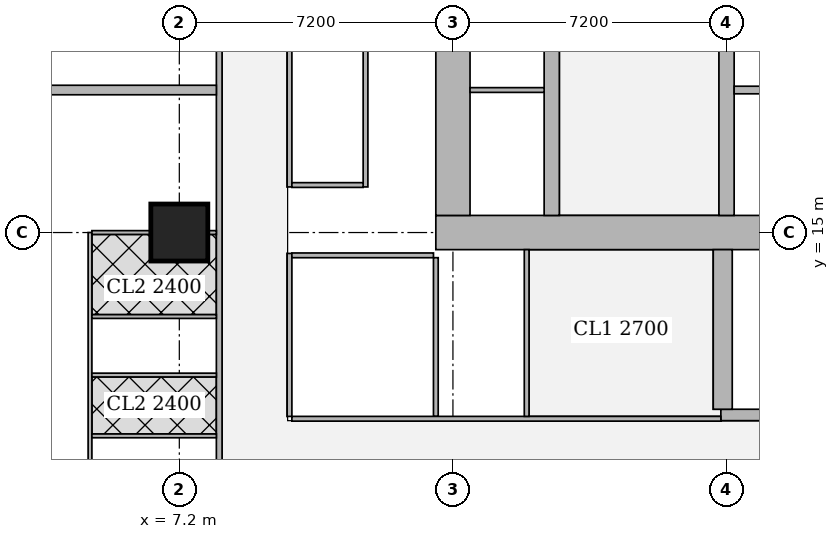
"""IFC4 building model, lengths in metres.
Left out: names, types, materials, properties, quantities, classifications, styles, units other than length and angle.
Written with IfcOpenShell. Run it as: python <this file> out.ifc"""

import sys

from ifc_helpers import new_model, si_unit, direction, frame, frame_2d, origin, origin_2d, place, context, subcontext, project, spatial, rectangle, extrude, element, fill, save


model = new_model("IFC4")
c1 = context("Model", 3, precision=1e-05, world=origin(), true_north=direction((0.0, 1.0)))
c2 = subcontext(c1, "Body", "Model", "MODEL_VIEW")
j1 = project(units=[si_unit("LENGTHUNIT", "METRE"), si_unit("PLANEANGLEUNIT", "RADIAN")], contexts=[c1])
p1 = place(None, origin())
s1 = spatial("IfcSite", under=j1, at=p1, CompositionType="ELEMENT")
p2 = place(p1, origin())
s2 = spatial("IfcBuilding", under=s1, at=p2, CompositionType="ELEMENT")
p3 = place(p2, frame((0.0, 0.0, 147.05)))
s3 = spatial("IfcBuildingStorey", under=s2, at=p3, CompositionType="ELEMENT", Elevation=147.05)
p4 = place(p3, frame((7.2, 15.0, 0.0), z_axis=(0.0, 0.0, 1.0), x_axis=(1.0, 0.0, 0.0)))
e1 = element("IfcColumn", 1, at=p4, inside=s3, PredefinedType="COLUMN", context=c2, shape_type="SweptSolid", body=[
    extrude(rectangle(XDim=1.5, YDim=1.5, at=origin_2d()), origin(), (0.0, 0.0, 1.0), 3.75),
])
p5 = place(p3, frame((13.95, 15.0, 0.0), z_axis=(0.0, 0.0, 1.0), x_axis=(1.0, 0.0, 0.0)))
e2 = element("IfcWall", 2, at=p5, inside=s3, PredefinedType="SHEAR", context=c2, shape_type="SweptSolid", body=[
    extrude(rectangle(XDim=15.3, YDim=0.9, at=frame_2d((7.65, 0.0))), origin(), (0.0, 0.0, 1.0), 3.75),
])
p6 = place(p5, frame((4.45, 0.0, 0.0)))
e3 = element("IfcOpeningElement", 3, at=p6, cuts=e2, PredefinedType="OPENING", context=c2, shape_type="SweptSolid", body=[
    extrude(rectangle(XDim=1.8, YDim=2.1, at=frame_2d((0.9, 1.05))), frame((0.0, 0.46, 0.0), z_axis=(0.0, -1.0, 0.0), x_axis=(1.0, 0.0, 0.0)), (0.0, 0.0, 1.0), 0.92),
])
p7 = place(p5, frame((10.7, 0.0, 0.0)))
e4 = element("IfcOpeningElement", 4, at=p7, cuts=e2, PredefinedType="OPENING", context=c2, shape_type="SweptSolid", body=[
    extrude(rectangle(XDim=1.1, YDim=2.1, at=frame_2d((0.55, 1.05))), frame((0.0, 0.46, 0.0), z_axis=(0.0, -1.0, 0.0), x_axis=(1.0, 0.0, 0.0)), (0.0, 0.0, 1.0), 0.92),
])
p8 = place(p3, frame((14.4, 15.45, 0.0), z_axis=(0.0, 0.0, 1.0), x_axis=(0.0, 1.0, 0.0)))
e5 = element("IfcWall", 5, at=p8, inside=s3, PredefinedType="SHEAR", context=c2, shape_type="SweptSolid", body=[
    extrude(rectangle(XDim=14.1, YDim=0.9, at=frame_2d((7.05, 0.0))), origin(), (0.0, 0.0, 1.0), 3.75),
])
p9 = place(p3, frame((17.0, 15.45, 0.0), z_axis=(0.0, 0.0, 1.0), x_axis=(0.0, 1.0, 0.0)))
e6 = element("IfcWall", 6, at=p9, inside=s3, PredefinedType="SHEAR", context=c2, shape_type="SweptSolid", body=[
    extrude(rectangle(XDim=14.1, YDim=0.4, at=frame_2d((7.05, 0.0))), origin(), (0.0, 0.0, 1.0), 3.75),
])
p10 = place(p9, frame((0.925, 0.0, 0.0)))
e7 = element("IfcOpeningElement", 7, at=p10, cuts=e6, PredefinedType="OPENING", context=c2, shape_type="SweptSolid", body=[
    extrude(rectangle(XDim=1.0, YDim=2.1, at=frame_2d((0.5, 1.05))), frame((0.0, 0.21, 0.0), z_axis=(0.0, -1.0, 0.0), x_axis=(1.0, 0.0, 0.0)), (0.0, 0.0, 1.0), 0.42),
])
p11 = place(p9, frame((4.675, 0.0, 0.0)))
e8 = element("IfcOpeningElement", 8, at=p11, cuts=e6, PredefinedType="OPENING", context=c2, shape_type="SweptSolid", body=[
    extrude(rectangle(XDim=1.0, YDim=2.1, at=frame_2d((0.5, 1.05))), frame((0.0, 0.21, 0.0), z_axis=(0.0, -1.0, 0.0), x_axis=(1.0, 0.0, 0.0)), (0.0, 0.0, 1.0), 0.42),
])
p12 = place(p9, frame((8.425, 0.0, 0.0)))
e9 = element("IfcOpeningElement", 9, at=p12, cuts=e6, PredefinedType="OPENING", context=c2, shape_type="SweptSolid", body=[
    extrude(rectangle(XDim=1.0, YDim=2.1, at=frame_2d((0.5, 1.05))), frame((0.0, 0.21, 0.0), z_axis=(0.0, -1.0, 0.0), x_axis=(1.0, 0.0, 0.0)), (0.0, 0.0, 1.0), 0.42),
])
p13 = place(p9, frame((12.175, 0.0, 0.0)))
e10 = element("IfcOpeningElement", 10, at=p13, cuts=e6, PredefinedType="OPENING", context=c2, shape_type="SweptSolid", body=[
    extrude(rectangle(XDim=1.0, YDim=2.1, at=frame_2d((0.5, 1.05))), frame((0.0, 0.21, 0.0), z_axis=(0.0, -1.0, 0.0), x_axis=(1.0, 0.0, 0.0)), (0.0, 0.0, 1.0), 0.42),
])
p14 = place(p3, frame((21.6, 15.45, 0.0), z_axis=(0.0, 0.0, 1.0), x_axis=(0.0, 1.0, 0.0)))
e11 = element("IfcWall", 11, at=p14, inside=s3, PredefinedType="SHEAR", context=c2, shape_type="SweptSolid", body=[
    extrude(rectangle(XDim=14.1, YDim=0.4, at=frame_2d((7.05, 0.0))), origin(), (0.0, 0.0, 1.0), 3.75),
])
p15 = place(p14, frame((0.875, 0.0, 0.0)))
e12 = element("IfcOpeningElement", 12, at=p15, cuts=e11, PredefinedType="OPENING", context=c2, shape_type="SweptSolid", body=[
    extrude(rectangle(XDim=1.1, YDim=2.1, at=frame_2d((0.55, 1.05))), frame((0.0, 0.21, 0.0), z_axis=(0.0, -1.0, 0.0), x_axis=(1.0, 0.0, 0.0)), (0.0, 0.0, 1.0), 0.42),
])
p16 = place(p14, frame((4.625, 0.0, 0.0)))
e13 = element("IfcOpeningElement", 13, at=p16, cuts=e11, PredefinedType="OPENING", context=c2, shape_type="SweptSolid", body=[
    extrude(rectangle(XDim=1.1, YDim=2.1, at=frame_2d((0.55, 1.05))), frame((0.0, 0.21, 0.0), z_axis=(0.0, -1.0, 0.0), x_axis=(1.0, 0.0, 0.0)), (0.0, 0.0, 1.0), 0.42),
])
p17 = place(p14, frame((8.375, 0.0, 0.0)))
e14 = element("IfcOpeningElement", 14, at=p17, cuts=e11, PredefinedType="OPENING", context=c2, shape_type="SweptSolid", body=[
    extrude(rectangle(XDim=1.1, YDim=2.1, at=frame_2d((0.55, 1.05))), frame((0.0, 0.21, 0.0), z_axis=(0.0, -1.0, 0.0), x_axis=(1.0, 0.0, 0.0)), (0.0, 0.0, 1.0), 0.42),
])
p18 = place(p14, frame((12.125, 0.0, 0.0)))
e15 = element("IfcOpeningElement", 15, at=p18, cuts=e11, PredefinedType="OPENING", context=c2, shape_type="SweptSolid", body=[
    extrude(rectangle(XDim=1.1, YDim=2.1, at=frame_2d((0.55, 1.05))), frame((0.0, 0.21, 0.0), z_axis=(0.0, -1.0, 0.0), x_axis=(1.0, 0.0, 0.0)), (0.0, 0.0, 1.0), 0.42),
])
p19 = place(p3, frame((21.45, 10.2, 0.0), z_axis=(0.0, 0.0, 1.0), x_axis=(1.0, 0.0, 0.0)))
e16 = element("IfcWall", 16, at=p19, inside=s3, PredefinedType="SHEAR", context=c2, shape_type="SweptSolid", body=[
    extrude(rectangle(XDim=7.5, YDim=0.3, at=frame_2d((3.75, 0.0))), origin(), (0.0, 0.0, 1.0), 3.75),
])
p20 = place(p19, frame((0.5, 0.0, 0.0)))
e17 = element("IfcOpeningElement", 17, at=p20, cuts=e16, PredefinedType="OPENING", context=c2, shape_type="SweptSolid", body=[
    extrude(rectangle(XDim=1.1, YDim=2.1, at=frame_2d((0.55, 1.05))), frame((0.0, 0.16, 0.0), z_axis=(0.0, -1.0, 0.0), x_axis=(1.0, 0.0, 0.0)), (0.0, 0.0, 1.0), 0.32),
])
p21 = place(p3, frame((21.5, 10.35, 0.0), z_axis=(0.0, 0.0, 1.0), x_axis=(0.0, 1.0, 0.0)))
e18 = element("IfcWall", 18, at=p21, inside=s3, PredefinedType="SHEAR", context=c2, shape_type="SweptSolid", body=[
    extrude(rectangle(XDim=4.2, YDim=0.5, at=frame_2d((2.1, 0.0))), origin(), (0.0, 0.0, 1.0), 3.75),
])
p22 = place(p3, frame((8.25, 1.957, 0.0), z_axis=(0.0, 0.0, 1.0), x_axis=(0.0, 1.0, 0.0)))
e19 = element("IfcWall", 19, at=p22, inside=s3, PredefinedType="SOLIDWALL", context=c2, shape_type="SweptSolid", body=[
    extrude(rectangle(XDim=41.111, YDim=0.15, at=frame_2d((20.556, 0.0))), origin(), (0.0, 0.0, 1.0), 3.5),
])
p23 = place(p22, frame((14.418, 0.0, 0.0)))
e20 = element("IfcOpeningElement", 20, at=p23, cuts=e19, PredefinedType="OPENING", context=c2, shape_type="SweptSolid", body=[
    extrude(rectangle(XDim=1.0, YDim=2.1, at=frame_2d((0.5, 1.05))), frame((0.0, 0.085, 0.0), z_axis=(0.0, -1.0, 0.0), x_axis=(1.0, 0.0, 0.0)), (0.0, 0.0, 1.0), 0.17),
])
p24 = place(p22, frame((18.168, 0.0, 0.0)))
e21 = element("IfcOpeningElement", 21, at=p24, cuts=e19, PredefinedType="OPENING", context=c2, shape_type="SweptSolid", body=[
    extrude(rectangle(XDim=1.0, YDim=2.1, at=frame_2d((0.5, 1.05))), frame((0.0, 0.085, 0.0), z_axis=(0.0, -1.0, 0.0), x_axis=(1.0, 0.0, 0.0)), (0.0, 0.0, 1.0), 0.17),
])
p25 = place(p22, frame((33.168, 0.0, 0.0)))
e22 = element("IfcOpeningElement", 22, at=p25, cuts=e19, PredefinedType="OPENING", context=c2, shape_type="SweptSolid", body=[
    extrude(rectangle(XDim=1.0, YDim=2.1, at=frame_2d((0.5, 1.05))), frame((0.0, 0.085, 0.0), z_axis=(0.0, -1.0, 0.0), x_axis=(1.0, 0.0, 0.0)), (0.0, 0.0, 1.0), 0.17),
])
p26 = place(p3, frame((4.85, 2.505, 0.0), z_axis=(0.0, 0.0, 1.0), x_axis=(0.0, 1.0, 0.0)))
e23 = element("IfcWall", 23, at=p26, inside=s3, PredefinedType="PARTITIONING", context=c2, shape_type="SweptSolid", body=[
    extrude(rectangle(XDim=12.495, YDim=0.1, at=frame_2d((6.248, 0.0))), origin(), (0.0, 0.0, 1.0), 3.5),
])
p27 = place(p26, frame((10.94, 0.0, 0.0)))
e24 = element("IfcOpeningElement", 24, at=p27, cuts=e23, PredefinedType="OPENING", context=c2, shape_type="SweptSolid", body=[
    extrude(rectangle(XDim=0.9, YDim=2.1, at=frame_2d((0.45, 1.05))), frame((0.0, 0.06, 0.0), z_axis=(0.0, -1.0, 0.0), x_axis=(1.0, 0.0, 0.0)), (0.0, 0.0, 1.0), 0.12),
])
p28 = place(p26, frame((7.495, 0.0, 0.0)))
e25 = element("IfcOpeningElement", 25, at=p28, cuts=e23, PredefinedType="OPENING", context=c2, shape_type="SweptSolid", body=[
    extrude(rectangle(XDim=0.9, YDim=2.1, at=frame_2d((0.45, 1.05))), frame((0.0, 0.06, 0.0), z_axis=(0.0, -1.0, 0.0), x_axis=(1.0, 0.0, 0.0)), (0.0, 0.0, 1.0), 0.12),
])
p29 = place(p26, frame((3.635, 0.0, 0.0)))
e26 = element("IfcOpeningElement", 26, at=p29, cuts=e23, PredefinedType="OPENING", context=c2, shape_type="SweptSolid", body=[
    extrude(rectangle(XDim=0.9, YDim=2.1, at=frame_2d((0.45, 1.05))), frame((0.0, 0.06, 0.0), z_axis=(0.0, -1.0, 0.0), x_axis=(1.0, 0.0, 0.0)), (0.0, 0.0, 1.0), 0.12),
])
p30 = place(p26, frame((9.065, 0.0, 0.0)))
e27 = element("IfcOpeningElement", 27, at=p30, cuts=e23, PredefinedType="OPENING", context=c2, shape_type="SweptSolid", body=[
    extrude(rectangle(XDim=0.9, YDim=2.1, at=frame_2d((0.45, 1.05))), frame((0.0, 0.06, 0.0), z_axis=(0.0, -1.0, 0.0), x_axis=(1.0, 0.0, 0.0)), (0.0, 0.0, 1.0), 0.12),
])
p31 = place(p26, frame((5.62, 0.0, 0.0)))
e28 = element("IfcOpeningElement", 28, at=p31, cuts=e23, PredefinedType="OPENING", context=c2, shape_type="SweptSolid", body=[
    extrude(rectangle(XDim=0.9, YDim=2.1, at=frame_2d((0.45, 1.05))), frame((0.0, 0.06, 0.0), z_axis=(0.0, -1.0, 0.0), x_axis=(1.0, 0.0, 0.0)), (0.0, 0.0, 1.0), 0.12),
])
p32 = place(p26, frame((1.76, 0.0, 0.0)))
e29 = element("IfcOpeningElement", 29, at=p32, cuts=e23, PredefinedType="OPENING", context=c2, shape_type="SweptSolid", body=[
    extrude(rectangle(XDim=0.9, YDim=2.1, at=frame_2d((0.45, 1.05))), frame((0.0, 0.06, 0.0), z_axis=(0.0, -1.0, 0.0), x_axis=(1.0, 0.0, 0.0)), (0.0, 0.0, 1.0), 0.12),
])
p33 = place(p3, frame((4.9, 11.25, 0.0), z_axis=(0.0, 0.0, 1.0), x_axis=(1.0, 0.0, 0.0)))
e30 = element("IfcWall", 30, at=p33, inside=s3, PredefinedType="PARTITIONING", context=c2, shape_type="SweptSolid", body=[
    extrude(rectangle(XDim=3.275, YDim=0.1, at=frame_2d((1.638, 0.0))), origin(), (0.0, 0.0, 1.0), 3.5),
])
p34 = place(p3, frame((4.9, 15.0, 0.0), z_axis=(0.0, 0.0, 1.0), x_axis=(1.0, 0.0, 0.0)))
e31 = element("IfcWall", 31, at=p34, inside=s3, PredefinedType="PARTITIONING", context=c2, shape_type="SweptSolid", body=[
    extrude(rectangle(XDim=1.549, YDim=0.1, at=frame_2d((0.774, 0.0))), origin(), (0.0, 0.0, 1.0), 3.5),
])
p35 = place(p3, frame((7.951, 15.0, 0.0), z_axis=(0.0, 0.0, 1.0), x_axis=(1.0, 0.0, 0.0)))
e32 = element("IfcWall", 32, at=p35, inside=s3, PredefinedType="PARTITIONING", context=c2, shape_type="SweptSolid", body=[
    extrude(rectangle(XDim=0.224, YDim=0.1, at=frame_2d((0.112, 0.0))), origin(), (0.0, 0.0, 1.0), 3.5),
])
for number, where, z_axis, x_axis in (
    (33, (4.9, 12.79, 0.0), (0.0, 0.0, 1.0), (1.0, 0.0, 0.0)),
    (34, (4.9, 9.65, 0.0), (0.0, 0.0, 1.0), (1.0, 0.0, 0.0)),
):
    element("IfcWall", number, at=place(p3, frame(where, z_axis=z_axis, x_axis=x_axis)), inside=s3, PredefinedType="PARTITIONING", context=c2, shape_type="SweptSolid", body=[
        extrude(rectangle(XDim=3.275, YDim=0.1, at=frame_2d((1.638, 0.0))), origin(), (0.0, 0.0, 1.0), 3.5),
    ])
p36 = place(p3, frame((3.65, 18.75, 0.0), z_axis=(0.0, 0.0, 1.0), x_axis=(1.0, 0.0, 0.0)))
e35 = element("IfcWall", 35, at=p36, inside=s3, PredefinedType="SOLIDWALL", context=c2, shape_type="SweptSolid", body=[
    extrude(rectangle(XDim=4.525, YDim=0.25, at=frame_2d((2.263, 0.0))), origin(), (0.0, 0.0, 1.0), 3.5),
])
p37 = place(p3, frame((10.1, 10.162, 0.0), z_axis=(0.0, 0.0, 1.0), x_axis=(0.0, 1.0, 0.0)))
e36 = element("IfcWall", 36, at=p37, inside=s3, PredefinedType="PARTITIONING", context=c2, shape_type="SweptSolid", body=[
    extrude(rectangle(XDim=4.288, YDim=0.125, at=frame_2d((2.144, 0.0))), origin(), (0.0, 0.0, 1.0), 3.5),
])
p38 = place(p37, frame((1.563, 0.0, 0.0)))
e37 = element("IfcOpeningElement", 37, at=p38, cuts=e36, PredefinedType="OPENING", context=c2, shape_type="SweptSolid", body=[
    extrude(rectangle(XDim=1.0, YDim=2.1, at=frame_2d((0.5, 1.05))), frame((0.0, 0.073, 0.0), z_axis=(0.0, -1.0, 0.0), x_axis=(1.0, 0.0, 0.0)), (0.0, 0.0, 1.0), 0.145),
])
p39 = place(p3, frame((10.1, 16.2, 0.0), z_axis=(0.0, 0.0, 1.0), x_axis=(0.0, 1.0, 0.0)))
e38 = element("IfcWall", 38, at=p39, inside=s3, PredefinedType="PARTITIONING", context=c2, shape_type="SweptSolid", body=[
    extrude(rectangle(XDim=18.638, YDim=0.125, at=frame_2d((9.319, 0.0))), origin(), (0.0, 0.0, 1.0), 3.5),
])
p40 = place(p39, frame((1.6, 0.0, 0.0)))
e39 = element("IfcOpeningElement", 39, at=p40, cuts=e38, PredefinedType="OPENING", context=c2, shape_type="SweptSolid", body=[
    extrude(rectangle(XDim=1.0, YDim=2.1, at=frame_2d((0.5, 1.05))), frame((0.0, 0.073, 0.0), z_axis=(0.0, -1.0, 0.0), x_axis=(1.0, 0.0, 0.0)), (0.0, 0.0, 1.0), 0.145),
])
p41 = place(p39, frame((5.5, 0.0, 0.0)))
e40 = element("IfcOpeningElement", 40, at=p41, cuts=e38, PredefinedType="OPENING", context=c2, shape_type="SweptSolid", body=[
    extrude(rectangle(XDim=1.0, YDim=2.1, at=frame_2d((0.5, 1.05))), frame((0.0, 0.073, 0.0), z_axis=(0.0, -1.0, 0.0), x_axis=(1.0, 0.0, 0.0)), (0.0, 0.0, 1.0), 0.145),
])
p42 = place(p39, frame((12.775, 0.0, 0.0)))
e41 = element("IfcOpeningElement", 41, at=p42, cuts=e38, PredefinedType="OPENING", context=c2, shape_type="SweptSolid", body=[
    extrude(rectangle(XDim=1.0, YDim=2.1, at=frame_2d((0.5, 1.05))), frame((0.0, 0.073, 0.0), z_axis=(0.0, -1.0, 0.0), x_axis=(1.0, 0.0, 0.0)), (0.0, 0.0, 1.0), 0.145),
])
p43 = place(p3, frame((10.162, 14.4, 0.0), z_axis=(0.0, 0.0, 1.0), x_axis=(1.0, 0.0, 0.0)))
e42 = element("IfcWall", 42, at=p43, inside=s3, PredefinedType="PARTITIONING", context=c2, shape_type="SweptSolid", body=[
    extrude(rectangle(XDim=3.726, YDim=0.125, at=frame_2d((1.863, 0.0))), origin(), (0.0, 0.0, 1.0), 3.5),
])
p44 = place(p3, frame((12.1, 16.2, 0.0), z_axis=(0.0, 0.0, 1.0), x_axis=(0.0, 1.0, 0.0)))
e43 = element("IfcWall", 43, at=p44, inside=s3, PredefinedType="PARTITIONING", context=c2, shape_type="SweptSolid", body=[
    extrude(rectangle(XDim=18.637, YDim=0.125, at=frame_2d((9.318, 0.0))), origin(), (0.0, 0.0, 1.0), 3.5),
])
p45 = place(p3, frame((10.162, 16.25, 0.0), z_axis=(0.0, 0.0, 1.0), x_axis=(1.0, 0.0, 0.0)))
e44 = element("IfcWall", 44, at=p45, inside=s3, PredefinedType="PARTITIONING", context=c2, shape_type="SweptSolid", body=[
    extrude(rectangle(XDim=1.875, YDim=0.125, at=frame_2d((0.938, 0.0))), origin(), (0.0, 0.0, 1.0), 3.5),
])
p46 = place(p3, frame((13.95, 10.163, 0.0), z_axis=(0.0, 0.0, 1.0), x_axis=(0.0, 1.0, 0.0)))
e45 = element("IfcWall", 45, at=p46, inside=s3, PredefinedType="PARTITIONING", context=c2, shape_type="SweptSolid", body=[
    extrude(rectangle(XDim=4.175, YDim=0.125, at=frame_2d((2.087, 0.0))), origin(), (0.0, 0.0, 1.0), 3.5),
])
p47 = place(p3, frame((10.162, 10.1, 0.0), z_axis=(0.0, 0.0, 1.0), x_axis=(1.0, 0.0, 0.0)))
e46 = element("IfcWall", 46, at=p47, inside=s3, PredefinedType="PARTITIONING", context=c2, shape_type="SweptSolid", body=[
    extrude(rectangle(XDim=11.288, YDim=0.125, at=frame_2d((5.644, 0.0))), origin(), (0.0, 0.0, 1.0), 3.5),
])
p48 = place(p47, frame((7.833, 0.0, 0.0)))
e47 = element("IfcOpeningElement", 47, at=p48, cuts=e46, PredefinedType="OPENING", context=c2, shape_type="SweptSolid", body=[
    extrude(rectangle(XDim=1.8, YDim=2.1, at=frame_2d((0.9, 1.05))), frame((0.0, 0.073, 0.0), z_axis=(0.0, -1.0, 0.0), x_axis=(1.0, 0.0, 0.0)), (0.0, 0.0, 1.0), 0.145),
])
p49 = place(p3, frame((16.34, 10.163, 0.0), z_axis=(0.0, 0.0, 1.0), x_axis=(0.0, 1.0, 0.0)))
e48 = element("IfcWall", 48, at=p49, inside=s3, PredefinedType="PARTITIONING", context=c2, shape_type="SweptSolid", body=[
    extrude(rectangle(XDim=4.387, YDim=0.125, at=frame_2d((2.193, 0.0))), origin(), (0.0, 0.0, 1.0), 3.5),
])
p50 = place(p49, frame((1.637, 0.0, 0.0)))
e49 = element("IfcOpeningElement", 49, at=p50, cuts=e48, PredefinedType="OPENING", context=c2, shape_type="SweptSolid", body=[
    extrude(rectangle(XDim=1.0, YDim=2.1, at=frame_2d((0.5, 1.05))), frame((0.0, 0.073, 0.0), z_axis=(0.0, -1.0, 0.0), x_axis=(1.0, 0.0, 0.0)), (0.0, 0.0, 1.0), 0.145),
])
p51 = place(p3, frame((14.85, 18.75, 0.0), z_axis=(0.0, 0.0, 1.0), x_axis=(1.0, 0.0, 0.0)))
e50 = element("IfcWall", 50, at=p51, inside=s3, PredefinedType="PARTITIONING", context=c2, shape_type="SweptSolid", body=[
    extrude(rectangle(XDim=1.95, YDim=0.125, at=frame_2d((0.975, 0.0))), origin(), (0.0, 0.0, 1.0), 3.5),
])
p52 = place(p3, frame((21.8, 18.75, 0.0), z_axis=(0.0, 0.0, 1.0), x_axis=(1.0, 0.0, 0.0)))
e51 = element("IfcWall", 51, at=p52, inside=s3, PredefinedType="SOLIDWALL", context=c2, shape_type="SweptSolid", body=[
    extrude(rectangle(XDim=2.2, YDim=0.2, at=frame_2d((1.1, 0.0))), origin(), (0.0, 0.0, 1.0), 3.5),
])
p53 = place(p27, origin())
e52 = element("IfcDoor", 52, at=p53, inside=s3, OperationType="SINGLE_SWING_LEFT", PredefinedType="DOOR", context=c2, shape_type="SweptSolid", body=[
    extrude(rectangle(XDim=0.9, YDim=2.1, at=frame_2d((0.45, 1.05))), frame((0.0, 0.025, 0.0), z_axis=(0.0, -1.0, 0.0), x_axis=(1.0, 0.0, 0.0)), (0.0, 0.0, 1.0), 0.05),
])
fill(e24, e52)
p54 = place(p28, origin())
e53 = element("IfcDoor", 53, at=p54, inside=s3, OperationType="SINGLE_SWING_RIGHT", PredefinedType="DOOR", context=c2, shape_type="SweptSolid", body=[
    extrude(rectangle(XDim=0.9, YDim=2.1, at=frame_2d((0.45, 1.05))), frame((0.0, 0.025, 0.0), z_axis=(0.0, -1.0, 0.0), x_axis=(1.0, 0.0, 0.0)), (0.0, 0.0, 1.0), 0.05),
])
fill(e25, e53)
p55 = place(p30, origin())
e54 = element("IfcDoor", 54, at=p55, inside=s3, OperationType="SINGLE_SWING_LEFT", PredefinedType="DOOR", context=c2, shape_type="SweptSolid", body=[
    extrude(rectangle(XDim=0.9, YDim=2.1, at=frame_2d((0.45, 1.05))), frame((0.0, 0.025, 0.0), z_axis=(0.0, -1.0, 0.0), x_axis=(1.0, 0.0, 0.0)), (0.0, 0.0, 1.0), 0.05),
])
fill(e27, e54)
p56 = place(p23, origin())
e55 = element("IfcDoor", 55, at=p56, inside=s3, OperationType="SINGLE_SWING_RIGHT", PredefinedType="DOOR", context=c2, shape_type="SweptSolid", body=[
    extrude(rectangle(XDim=1.0, YDim=2.1, at=frame_2d((0.5, 1.05))), frame((0.0, 0.025, 0.0), z_axis=(0.0, -1.0, 0.0), x_axis=(1.0, 0.0, 0.0)), (0.0, 0.0, 1.0), 0.05),
])
fill(e20, e55)
p57 = place(p38, origin())
e56 = element("IfcDoor", 56, at=p57, inside=s3, OperationType="SINGLE_SWING_RIGHT", PredefinedType="DOOR", context=c2, shape_type="SweptSolid", body=[
    extrude(rectangle(XDim=1.0, YDim=2.1, at=frame_2d((0.5, 1.05))), frame((0.0, 0.025, 0.0), z_axis=(0.0, -1.0, 0.0), x_axis=(1.0, 0.0, 0.0)), (0.0, 0.0, 1.0), 0.05),
])
fill(e37, e56)
p58 = place(p40, origin())
e57 = element("IfcDoor", 57, at=p58, inside=s3, OperationType="SINGLE_SWING_RIGHT", PredefinedType="DOOR", context=c2, shape_type="SweptSolid", body=[
    extrude(rectangle(XDim=1.0, YDim=2.1, at=frame_2d((0.5, 1.05))), frame((0.0, 0.025, 0.0), z_axis=(0.0, -1.0, 0.0), x_axis=(1.0, 0.0, 0.0)), (0.0, 0.0, 1.0), 0.05),
])
fill(e39, e57)
p59 = place(p50, origin())
e58 = element("IfcDoor", 58, at=p59, inside=s3, OperationType="SINGLE_SWING_LEFT", PredefinedType="DOOR", context=c2, shape_type="SweptSolid", body=[
    extrude(rectangle(XDim=1.0, YDim=2.1, at=frame_2d((0.5, 1.05))), frame((0.0, 0.025, 0.0), z_axis=(0.0, -1.0, 0.0), x_axis=(1.0, 0.0, 0.0)), (0.0, 0.0, 1.0), 0.05),
])
fill(e49, e58)
p60 = place(p48, origin())
e59 = element("IfcDoor", 59, at=p60, inside=s3, OperationType="DOUBLE_DOOR_SINGLE_SWING", PredefinedType="DOOR", context=c2, shape_type="SweptSolid", body=[
    extrude(rectangle(XDim=1.8, YDim=2.1, at=frame_2d((0.9, 1.05))), frame((0.0, 0.025, 0.0), z_axis=(0.0, -1.0, 0.0), x_axis=(1.0, 0.0, 0.0)), (0.0, 0.0, 1.0), 0.05),
])
fill(e47, e59)
p61 = place(p10, origin())
e60 = element("IfcDoor", 60, at=p61, inside=s3, OperationType="SINGLE_SWING_LEFT", PredefinedType="DOOR", context=c2, shape_type="SweptSolid", body=[
    extrude(rectangle(XDim=1.0, YDim=2.1, at=frame_2d((0.5, 1.05))), frame((0.0, 0.025, 0.0), z_axis=(0.0, -1.0, 0.0), x_axis=(1.0, 0.0, 0.0)), (0.0, 0.0, 1.0), 0.05),
])
fill(e7, e60)
p62 = place(p6, origin())
e61 = element("IfcDoor", 61, at=p62, inside=s3, OperationType="DOUBLE_DOOR_SINGLE_SWING", PredefinedType="DOOR", context=c2, shape_type="SweptSolid", body=[
    extrude(rectangle(XDim=1.8, YDim=2.1, at=frame_2d((0.9, 1.05))), frame((0.0, 0.025, 0.0), z_axis=(0.0, -1.0, 0.0), x_axis=(1.0, 0.0, 0.0)), (0.0, 0.0, 1.0), 0.05),
])
fill(e3, e61)
p63 = place(p15, origin())
e62 = element("IfcDoor", 62, at=p63, inside=s3, OperationType="DOUBLE_DOOR_SLIDING", PredefinedType="DOOR", context=c2, shape_type="SweptSolid", body=[
    extrude(rectangle(XDim=1.1, YDim=2.1, at=frame_2d((0.55, 1.05))), frame((0.0, 0.025, 0.0), z_axis=(0.0, -1.0, 0.0), x_axis=(1.0, 0.0, 0.0)), (0.0, 0.0, 1.0), 0.05),
])
fill(e12, e62)
p64 = place(p20, origin())
e63 = element("IfcDoor", 63, at=p64, inside=s3, OperationType="SINGLE_SWING_LEFT", PredefinedType="DOOR", context=c2, shape_type="SweptSolid", body=[
    extrude(rectangle(XDim=1.1, YDim=2.1, at=frame_2d((0.55, 1.05))), frame((0.0, 0.025, 0.0), z_axis=(0.0, -1.0, 0.0), x_axis=(1.0, 0.0, 0.0)), (0.0, 0.0, 1.0), 0.05),
])
fill(e17, e63)
save(model, sys.argv[1])
